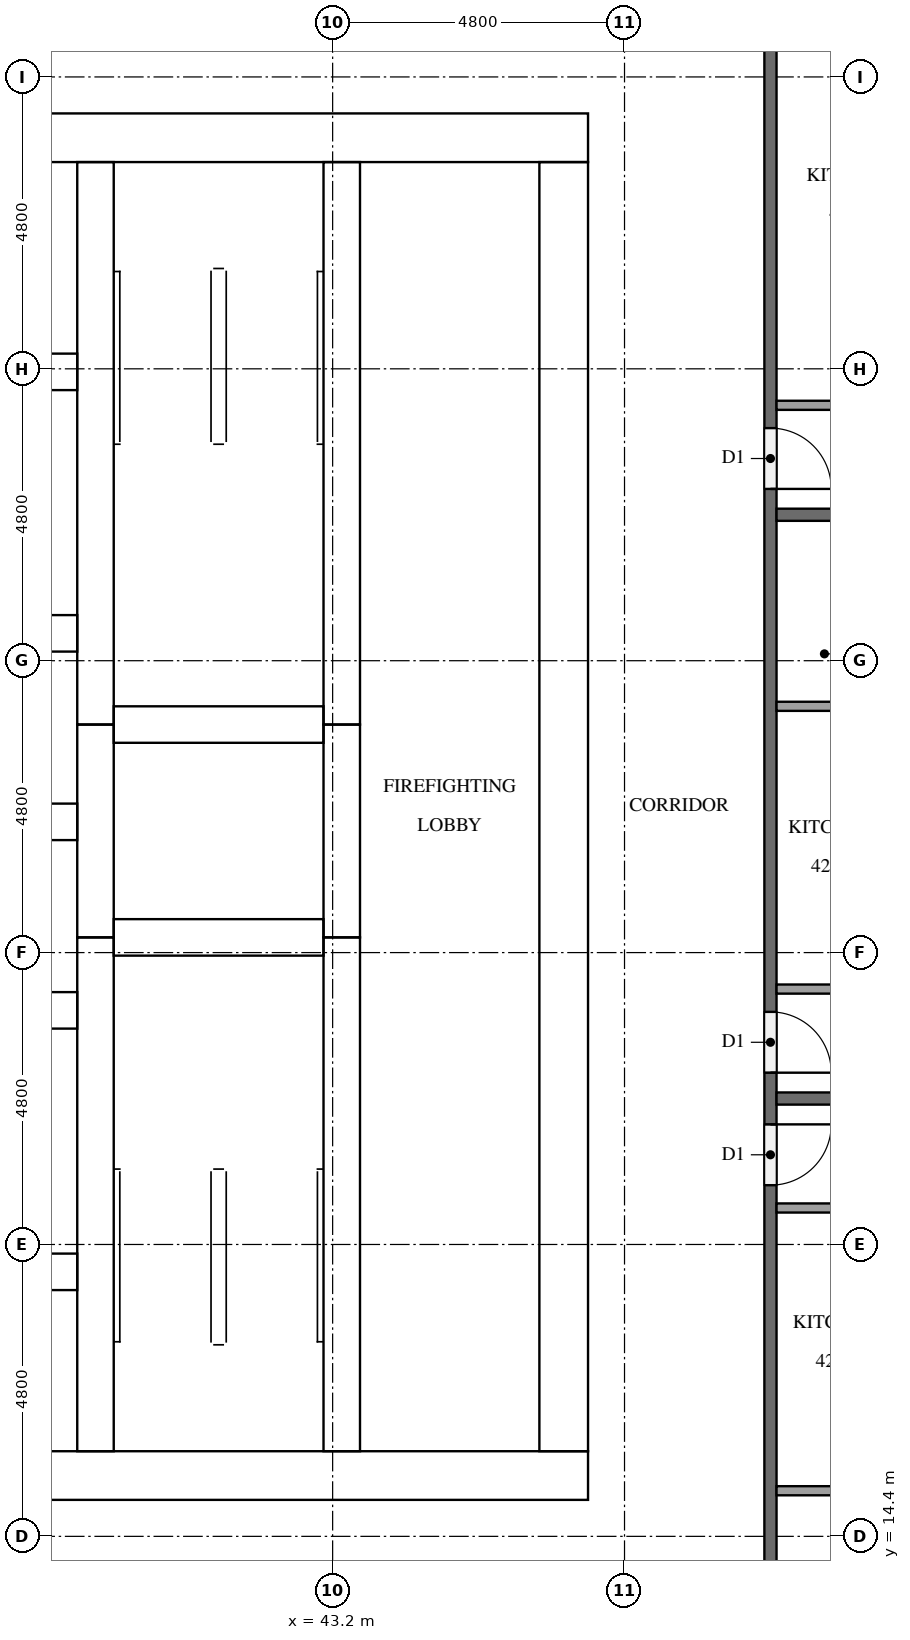
"""IFC4 building model, lengths in metres.
Left out: names, types, materials, properties, quantities, classifications, styles, units other than length and angle.
Written with IfcOpenShell. Run it as: python <this file> out.ifc"""

import sys

from ifc_helpers import new_model, si_unit, direction, frame, frame_2d, origin, place, context, subcontext, project, spatial, rectangle, extrude, element, fill, save


model = new_model("IFC4")
c1 = context("Model", 3, precision=1e-05, world=origin(), true_north=direction((0.0, 1.0)))
c2 = subcontext(c1, "Body", "Model", "MODEL_VIEW")
j1 = project(units=[si_unit("LENGTHUNIT", "METRE"), si_unit("PLANEANGLEUNIT", "RADIAN")], contexts=[c1])
p1 = place(None, origin())
s1 = spatial("IfcSite", under=j1, at=p1, CompositionType="ELEMENT")
p2 = place(p1, origin())
s2 = spatial("IfcBuilding", under=s1, at=p2, CompositionType="ELEMENT")
p3 = place(p2, frame((0.0, 0.0, 163.0)))
s3 = spatial("IfcBuildingStorey", under=s2, at=p3, CompositionType="ELEMENT", Elevation=163.0)
p4 = place(p3, frame((15.0, 15.4, 0.0), z_axis=(0.0, 0.0, 1.0), x_axis=(1.0, 0.0, 0.0)))
e1 = element("IfcWall", 1, at=p4, inside=s3, PredefinedType="SHEAR", context=c2, shape_type="SweptSolid", body=[
    extrude(rectangle(XDim=32.4, YDim=0.8, at=frame_2d((16.2, 0.0))), origin(), (0.0, 0.0, 1.0), 3.2),
])
p5 = place(p4, frame((15.3, 0.0, 0.0)))
e2 = element("IfcOpeningElement", 2, at=p5, cuts=e1, PredefinedType="OPENING", context=c2, shape_type="SweptSolid", body=[
    extrude(rectangle(XDim=1.8, YDim=2.1, at=frame_2d((0.9, 1.05))), frame((0.0, 0.41, 0.0), z_axis=(0.0, -1.0, 0.0), x_axis=(1.0, 0.0, 0.0)), (0.0, 0.0, 1.0), 0.82),
])
p6 = place(p3, frame((15.0, 37.4, 0.0), z_axis=(0.0, 0.0, 1.0), x_axis=(1.0, 0.0, 0.0)))
e3 = element("IfcWall", 3, at=p6, inside=s3, PredefinedType="SHEAR", context=c2, shape_type="SweptSolid", body=[
    extrude(rectangle(XDim=32.4, YDim=0.8, at=frame_2d((16.2, 0.0))), origin(), (0.0, 0.0, 1.0), 3.2),
])
p7 = place(p6, frame((15.3, 0.0, 0.0)))
e4 = element("IfcOpeningElement", 4, at=p7, cuts=e3, PredefinedType="OPENING", context=c2, shape_type="SweptSolid", body=[
    extrude(rectangle(XDim=1.8, YDim=2.1, at=frame_2d((0.9, 1.05))), frame((0.0, 0.41, 0.0), z_axis=(0.0, -1.0, 0.0), x_axis=(1.0, 0.0, 0.0)), (0.0, 0.0, 1.0), 0.82),
])
p8 = place(p6, frame((1.51, 0.0, 0.0)))
e5 = element("IfcOpeningElement", 5, at=p8, cuts=e3, PredefinedType="OPENING", context=c2, shape_type="SweptSolid", body=[
    extrude(rectangle(XDim=1.0, YDim=2.1, at=frame_2d((0.5, 1.05))), frame((0.0, 0.41, 0.0), z_axis=(0.0, -1.0, 0.0), x_axis=(1.0, 0.0, 0.0)), (0.0, 0.0, 1.0), 0.82),
])
p9 = place(p6, frame((5.11, 0.0, 0.0)))
e6 = element("IfcOpeningElement", 6, at=p9, cuts=e3, PredefinedType="OPENING", context=c2, shape_type="SweptSolid", body=[
    extrude(rectangle(XDim=1.0, YDim=2.1, at=frame_2d((0.5, 1.05))), frame((0.0, 0.41, 0.0), z_axis=(0.0, -1.0, 0.0), x_axis=(1.0, 0.0, 0.0)), (0.0, 0.0, 1.0), 0.82),
])
p10 = place(p3, frame((47.0, 15.8, 0.0), z_axis=(0.0, 0.0, 1.0), x_axis=(0.0, 1.0, 0.0)))
e7 = element("IfcWall", 7, at=p10, inside=s3, PredefinedType="SHEAR", context=c2, shape_type="SweptSolid", body=[
    extrude(rectangle(XDim=21.2, YDim=0.8, at=frame_2d((10.6, 0.0))), origin(), (0.0, 0.0, 1.0), 3.2),
])
p11 = place(p10, frame((10.3, 0.0, 0.0)))
e8 = element("IfcOpeningElement", 8, at=p11, cuts=e7, PredefinedType="OPENING", context=c2, shape_type="SweptSolid", body=[
    extrude(rectangle(XDim=1.2, YDim=2.1, at=frame_2d((0.6, 1.05))), frame((0.0, 0.41, 0.0), z_axis=(0.0, -1.0, 0.0), x_axis=(1.0, 0.0, 0.0)), (0.0, 0.0, 1.0), 0.82),
])
p12 = place(p3, frame((39.3, 15.8, 0.0), z_axis=(0.0, 0.0, 1.0), x_axis=(0.0, 1.0, 0.0)))
e9 = element("IfcWall", 9, at=p12, inside=s3, PredefinedType="SHEAR", context=c2, shape_type="SweptSolid", body=[
    extrude(rectangle(XDim=8.45, YDim=0.6, at=frame_2d((4.225, 0.0))), origin(), (0.0, 0.0, 1.0), 3.2),
])
p13 = place(p3, frame((39.3, 24.25, 0.0), z_axis=(0.0, 0.0, 1.0), x_axis=(0.0, 1.0, 0.0)))
e10 = element("IfcWall", 10, at=p13, inside=s3, PredefinedType="SHEAR", context=c2, shape_type="SweptSolid", body=[
    extrude(rectangle(XDim=3.5, YDim=0.6, at=frame_2d((1.75, 0.0))), origin(), (0.0, 0.0, 1.0), 3.2),
])
p14 = place(p3, frame((39.3, 27.75, 0.0), z_axis=(0.0, 0.0, 1.0), x_axis=(0.0, 1.0, 0.0)))
e11 = element("IfcWall", 11, at=p14, inside=s3, PredefinedType="SHEAR", context=c2, shape_type="SweptSolid", body=[
    extrude(rectangle(XDim=9.25, YDim=0.6, at=frame_2d((4.625, 0.0))), origin(), (0.0, 0.0, 1.0), 3.2),
])
p15 = place(p3, frame((43.35, 15.8, 0.0), z_axis=(0.0, 0.0, 1.0), x_axis=(0.0, 1.0, 0.0)))
e12 = element("IfcWall", 12, at=p15, inside=s3, PredefinedType="SHEAR", context=c2, shape_type="SweptSolid", body=[
    extrude(rectangle(XDim=8.45, YDim=0.6, at=frame_2d((4.225, 0.0))), origin(), (0.0, 0.0, 1.0), 3.2),
])
p16 = place(p15, frame((0.4, 0.0, 0.0)))
e13 = element("IfcOpeningElement", 13, at=p16, cuts=e12, PredefinedType="OPENING", context=c2, shape_type="SweptSolid", body=[
    extrude(rectangle(XDim=1.2, YDim=2.1, at=frame_2d((0.6, 1.05))), frame((0.0, 0.31, 0.0), z_axis=(0.0, -1.0, 0.0), x_axis=(1.0, 0.0, 0.0)), (0.0, 0.0, 1.0), 0.62),
])
p17 = place(p3, frame((43.35, 24.25, 0.0), z_axis=(0.0, 0.0, 1.0), x_axis=(0.0, 1.0, 0.0)))
e14 = element("IfcWall", 14, at=p17, inside=s3, PredefinedType="SHEAR", context=c2, shape_type="SweptSolid", body=[
    extrude(rectangle(XDim=3.5, YDim=0.6, at=frame_2d((1.75, 0.0))), origin(), (0.0, 0.0, 1.0), 3.2),
])
p18 = place(p17, frame((1.2, 0.0, 0.0)))
e15 = element("IfcOpeningElement", 15, at=p18, cuts=e14, PredefinedType="OPENING", context=c2, shape_type="SweptSolid", body=[
    extrude(rectangle(XDim=1.1, YDim=2.1, at=frame_2d((0.55, 1.05))), frame((0.0, 0.31, 0.0), z_axis=(0.0, -1.0, 0.0), x_axis=(1.0, 0.0, 0.0)), (0.0, 0.0, 1.0), 0.62),
])
p19 = place(p3, frame((43.35, 27.75, 0.0), z_axis=(0.0, 0.0, 1.0), x_axis=(0.0, 1.0, 0.0)))
e16 = element("IfcWall", 16, at=p19, inside=s3, PredefinedType="SHEAR", context=c2, shape_type="SweptSolid", body=[
    extrude(rectangle(XDim=9.25, YDim=0.6, at=frame_2d((4.625, 0.0))), origin(), (0.0, 0.0, 1.0), 3.2),
])
p20 = place(p19, frame((7.65, 0.0, 0.0)))
e17 = element("IfcOpeningElement", 17, at=p20, cuts=e16, PredefinedType="OPENING", context=c2, shape_type="SweptSolid", body=[
    extrude(rectangle(XDim=1.2, YDim=2.1, at=frame_2d((0.6, 1.05))), frame((0.0, 0.31, 0.0), z_axis=(0.0, -1.0, 0.0), x_axis=(1.0, 0.0, 0.0)), (0.0, 0.0, 1.0), 0.62),
])
for number, where, z_axis, x_axis in (
    (18, (39.6, 24.25, 0.0), (0.0, 0.0, 1.0), (1.0, 0.0, 0.0)),
    (19, (39.6, 27.75, 0.0), (0.0, 0.0, 1.0), (1.0, 0.0, 0.0)),
):
    element("IfcWall", number, at=place(p3, frame(where, z_axis=z_axis, x_axis=x_axis)), inside=s3, PredefinedType="SHEAR", context=c2, shape_type="SweptSolid", body=[
        extrude(rectangle(XDim=3.45, YDim=0.6, at=frame_2d((1.725, 0.0))), origin(), (0.0, 0.0, 1.0), 3.2),
    ])
p21 = place(p3, frame((33.4, 18.75, 0.0), z_axis=(0.0, 0.0, 1.0), x_axis=(1.0, 0.0, 0.0)))
e20 = element("IfcWall", 20, at=p21, inside=s3, PredefinedType="SHEAR", context=c2, shape_type="SweptSolid", body=[
    extrude(rectangle(XDim=5.6, YDim=0.6, at=frame_2d((2.8, 0.0))), origin(), (0.0, 0.0, 1.0), 3.2),
])
p22 = place(p21, frame((2.6, 0.0, 0.0)))
e21 = element("IfcOpeningElement", 21, at=p22, cuts=e20, PredefinedType="OPENING", context=c2, shape_type="SweptSolid", body=[
    extrude(rectangle(XDim=1.0, YDim=2.1, at=frame_2d((0.5, 1.05))), frame((0.0, 0.31, 0.0), z_axis=(0.0, -1.0, 0.0), x_axis=(1.0, 0.0, 0.0)), (0.0, 0.0, 1.0), 0.62),
])
p23 = place(p3, frame((23.4, 23.05, 0.0), z_axis=(0.0, 0.0, 1.0), x_axis=(1.0, 0.0, 0.0)))
e22 = element("IfcWall", 22, at=p23, inside=s3, PredefinedType="SHEAR", context=c2, shape_type="SweptSolid", body=[
    extrude(rectangle(XDim=15.6, YDim=0.6, at=frame_2d((7.8, 0.0))), origin(), (0.0, 0.0, 1.0), 3.2),
])
p24 = place(p23, frame((2.033, 0.0, 0.0)))
e23 = element("IfcOpeningElement", 23, at=p24, cuts=e22, PredefinedType="OPENING", context=c2, shape_type="SweptSolid", body=[
    extrude(rectangle(XDim=1.0, YDim=2.1, at=frame_2d((0.5, 1.05))), frame((0.0, 0.31, 0.0), z_axis=(0.0, -1.0, 0.0), x_axis=(1.0, 0.0, 0.0)), (0.0, 0.0, 1.0), 0.62),
])
p25 = place(p23, frame((12.567, 0.0, 0.0)))
e24 = element("IfcOpeningElement", 24, at=p25, cuts=e22, PredefinedType="OPENING", context=c2, shape_type="SweptSolid", body=[
    extrude(rectangle(XDim=1.0, YDim=2.1, at=frame_2d((0.5, 1.05))), frame((0.0, 0.31, 0.0), z_axis=(0.0, -1.0, 0.0), x_axis=(1.0, 0.0, 0.0)), (0.0, 0.0, 1.0), 0.62),
])
p26 = place(p3, frame((23.4, 26.15, 0.0), z_axis=(0.0, 0.0, 1.0), x_axis=(1.0, 0.0, 0.0)))
e25 = element("IfcWall", 25, at=p26, inside=s3, PredefinedType="SHEAR", context=c2, shape_type="SweptSolid", body=[
    extrude(rectangle(XDim=15.6, YDim=0.6, at=frame_2d((7.8, 0.0))), origin(), (0.0, 0.0, 1.0), 3.2),
])
p27 = place(p3, frame((23.4, 29.25, 0.0), z_axis=(0.0, 0.0, 1.0), x_axis=(1.0, 0.0, 0.0)))
e26 = element("IfcWall", 26, at=p27, inside=s3, PredefinedType="SHEAR", context=c2, shape_type="SweptSolid", body=[
    extrude(rectangle(XDim=15.6, YDim=0.6, at=frame_2d((7.8, 0.0))), origin(), (0.0, 0.0, 1.0), 3.2),
])
p28 = place(p27, frame((0.667, 0.0, 0.0)))
e27 = element("IfcOpeningElement", 27, at=p28, cuts=e26, PredefinedType="OPENING", context=c2, shape_type="SweptSolid", body=[
    extrude(rectangle(XDim=1.1, YDim=2.1, at=frame_2d((0.55, 1.05))), frame((0.0, 0.31, 0.0), z_axis=(0.0, -1.0, 0.0), x_axis=(1.0, 0.0, 0.0)), (0.0, 0.0, 1.0), 0.62),
])
p29 = place(p27, frame((3.3, 0.0, 0.0)))
e28 = element("IfcOpeningElement", 28, at=p29, cuts=e26, PredefinedType="OPENING", context=c2, shape_type="SweptSolid", body=[
    extrude(rectangle(XDim=1.1, YDim=2.1, at=frame_2d((0.55, 1.05))), frame((0.0, 0.31, 0.0), z_axis=(0.0, -1.0, 0.0), x_axis=(1.0, 0.0, 0.0)), (0.0, 0.0, 1.0), 0.62),
])
p30 = place(p27, frame((5.933, 0.0, 0.0)))
e29 = element("IfcOpeningElement", 29, at=p30, cuts=e26, PredefinedType="OPENING", context=c2, shape_type="SweptSolid", body=[
    extrude(rectangle(XDim=1.1, YDim=2.1, at=frame_2d((0.55, 1.05))), frame((0.0, 0.31, 0.0), z_axis=(0.0, -1.0, 0.0), x_axis=(1.0, 0.0, 0.0)), (0.0, 0.0, 1.0), 0.62),
])
p31 = place(p27, frame((8.567, 0.0, 0.0)))
e30 = element("IfcOpeningElement", 30, at=p31, cuts=e26, PredefinedType="OPENING", context=c2, shape_type="SweptSolid", body=[
    extrude(rectangle(XDim=1.1, YDim=2.1, at=frame_2d((0.55, 1.05))), frame((0.0, 0.31, 0.0), z_axis=(0.0, -1.0, 0.0), x_axis=(1.0, 0.0, 0.0)), (0.0, 0.0, 1.0), 0.62),
])
p32 = place(p27, frame((11.2, 0.0, 0.0)))
e31 = element("IfcOpeningElement", 31, at=p32, cuts=e26, PredefinedType="OPENING", context=c2, shape_type="SweptSolid", body=[
    extrude(rectangle(XDim=1.1, YDim=2.1, at=frame_2d((0.55, 1.05))), frame((0.0, 0.31, 0.0), z_axis=(0.0, -1.0, 0.0), x_axis=(1.0, 0.0, 0.0)), (0.0, 0.0, 1.0), 0.62),
])
p33 = place(p27, frame((13.833, 0.0, 0.0)))
e32 = element("IfcOpeningElement", 32, at=p33, cuts=e26, PredefinedType="OPENING", context=c2, shape_type="SweptSolid", body=[
    extrude(rectangle(XDim=1.1, YDim=2.1, at=frame_2d((0.55, 1.05))), frame((0.0, 0.31, 0.0), z_axis=(0.0, -1.0, 0.0), x_axis=(1.0, 0.0, 0.0)), (0.0, 0.0, 1.0), 0.62),
])
p34 = place(p3, frame((33.4, 33.55, 0.0), z_axis=(0.0, 0.0, 1.0), x_axis=(1.0, 0.0, 0.0)))
e33 = element("IfcWall", 33, at=p34, inside=s3, PredefinedType="SHEAR", context=c2, shape_type="SweptSolid", body=[
    extrude(rectangle(XDim=5.6, YDim=0.6, at=frame_2d((2.8, 0.0))), origin(), (0.0, 0.0, 1.0), 3.2),
])
p35 = place(p34, frame((2.6, 0.0, 0.0)))
e34 = element("IfcOpeningElement", 34, at=p35, cuts=e33, PredefinedType="OPENING", context=c2, shape_type="SweptSolid", body=[
    extrude(rectangle(XDim=1.0, YDim=2.1, at=frame_2d((0.5, 1.05))), frame((0.0, 0.31, 0.0), z_axis=(0.0, -1.0, 0.0), x_axis=(1.0, 0.0, 0.0)), (0.0, 0.0, 1.0), 0.62),
])
p36 = place(p3, frame((50.4, 40.7, 0.0), z_axis=(0.0, 0.0, 1.0), x_axis=(0.0, -1.0, 0.0)))
e35 = element("IfcWall", 35, at=p36, inside=s3, PredefinedType="PARTITIONING", context=c2, shape_type="SweptSolid", body=[
    extrude(rectangle(XDim=28.6, YDim=0.2, at=frame_2d((14.3, 0.0))), origin(), (0.0, 0.0, 1.0), 3.2),
])
p37 = place(p36, frame((19.525, 0.0, 0.0)))
e36 = element("IfcOpeningElement", 36, at=p37, cuts=e35, PredefinedType="OPENING", context=c2, shape_type="SweptSolid", body=[
    extrude(rectangle(XDim=1.0, YDim=2.1, at=frame_2d((0.5, 1.05))), frame((0.0, 0.11, 0.0), z_axis=(0.0, -1.0, 0.0), x_axis=(1.0, 0.0, 0.0)), (0.0, 0.0, 1.0), 0.22),
])
p38 = place(p36, frame((17.675, 0.0, 0.0)))
e37 = element("IfcOpeningElement", 37, at=p38, cuts=e35, PredefinedType="OPENING", context=c2, shape_type="SweptSolid", body=[
    extrude(rectangle(XDim=1.0, YDim=2.1, at=frame_2d((0.5, 1.05))), frame((0.0, 0.11, 0.0), z_axis=(0.0, -1.0, 0.0), x_axis=(1.0, 0.0, 0.0)), (0.0, 0.0, 1.0), 0.22),
])
p39 = place(p36, frame((8.075, 0.0, 0.0)))
e38 = element("IfcOpeningElement", 38, at=p39, cuts=e35, PredefinedType="OPENING", context=c2, shape_type="SweptSolid", body=[
    extrude(rectangle(XDim=1.0, YDim=2.1, at=frame_2d((0.5, 1.05))), frame((0.0, 0.11, 0.0), z_axis=(0.0, -1.0, 0.0), x_axis=(1.0, 0.0, 0.0)), (0.0, 0.0, 1.0), 0.22),
])
for number, where, z_axis, x_axis in (
    (39, (50.5, 21.6, 0.0), (0.0, 0.0, 1.0), (1.0, 0.0, 0.0)),
    (40, (50.5, 31.2, 0.0), (0.0, 0.0, 1.0), (1.0, 0.0, 0.0)),
):
    element("IfcWall", number, at=place(p3, frame(where, z_axis=z_axis, x_axis=x_axis)), inside=s3, PredefinedType="PARTITIONING", context=c2, shape_type="SweptSolid", body=[
        extrude(rectangle(XDim=7.0, YDim=0.2, at=frame_2d((3.5, 0.0))), origin(), (0.0, 0.0, 1.0), 3.2),
    ])
p40 = place(p3, frame((50.5, 15.15, 0.0), z_axis=(0.0, 0.0, 1.0), x_axis=(1.0, 0.0, 0.0)))
e41 = element("IfcWall", 41, at=p40, inside=s3, PredefinedType="PARTITIONING", context=c2, shape_type="SweptSolid", body=[
    extrude(rectangle(XDim=1.925, YDim=0.15, at=frame_2d((0.962, 0.0))), origin(), (0.0, 0.0, 1.0), 3.2),
])
p41 = place(p3, frame((50.5, 19.8, 0.0), z_axis=(0.0, 0.0, 1.0), x_axis=(1.0, 0.0, 0.0)))
e42 = element("IfcWall", 42, at=p41, inside=s3, PredefinedType="PARTITIONING", context=c2, shape_type="SweptSolid", body=[
    extrude(rectangle(XDim=2.075, YDim=0.15, at=frame_2d((1.038, 0.0))), origin(), (0.0, 0.0, 1.0), 3.2),
])
p42 = place(p3, frame((50.5, 28.05, 0.0), z_axis=(0.0, 0.0, 1.0), x_axis=(1.0, 0.0, 0.0)))
e43 = element("IfcWall", 43, at=p42, inside=s3, PredefinedType="PARTITIONING", context=c2, shape_type="SweptSolid", body=[
    extrude(rectangle(XDim=1.775, YDim=0.15, at=frame_2d((0.887, 0.0))), origin(), (0.0, 0.0, 1.0), 3.2),
])
p43 = place(p3, frame((50.5, 23.4, 0.0), z_axis=(0.0, 0.0, 1.0), x_axis=(1.0, 0.0, 0.0)))
e44 = element("IfcWall", 44, at=p43, inside=s3, PredefinedType="PARTITIONING", context=c2, shape_type="SweptSolid", body=[
    extrude(rectangle(XDim=1.925, YDim=0.15, at=frame_2d((0.962, 0.0))), origin(), (0.0, 0.0, 1.0), 3.2),
])
p44 = place(p3, frame((50.5, 33.0, 0.0), z_axis=(0.0, 0.0, 1.0), x_axis=(1.0, 0.0, 0.0)))
e45 = element("IfcWall", 45, at=p44, inside=s3, PredefinedType="PARTITIONING", context=c2, shape_type="SweptSolid", body=[
    extrude(rectangle(XDim=2.525, YDim=0.15, at=frame_2d((1.262, 0.0))), origin(), (0.0, 0.0, 1.0), 3.2),
])
p45 = place(p18, origin())
e46 = element("IfcDoor", 46, at=p45, inside=s3, OperationType="DOUBLE_DOOR_SLIDING", PredefinedType="DOOR", context=c2, shape_type="SweptSolid", body=[
    extrude(rectangle(XDim=1.1, YDim=2.1, at=frame_2d((0.55, 1.05))), frame((0.0, 0.025, 0.0), z_axis=(0.0, -1.0, 0.0), x_axis=(1.0, 0.0, 0.0)), (0.0, 0.0, 1.0), 0.05),
])
fill(e15, e46)
p46 = place(p16, origin())
e47 = element("IfcDoor", 47, at=p46, inside=s3, OperationType="SINGLE_SWING_LEFT", PredefinedType="DOOR", context=c2, shape_type="SweptSolid", body=[
    extrude(rectangle(XDim=1.2, YDim=2.1, at=frame_2d((0.6, 1.05))), frame((0.0, 0.025, 0.0), z_axis=(0.0, -1.0, 0.0), x_axis=(1.0, 0.0, 0.0)), (0.0, 0.0, 1.0), 0.05),
])
fill(e13, e47)
p47 = place(p20, origin())
e48 = element("IfcDoor", 48, at=p47, inside=s3, OperationType="SINGLE_SWING_RIGHT", PredefinedType="DOOR", context=c2, shape_type="SweptSolid", body=[
    extrude(rectangle(XDim=1.2, YDim=2.1, at=frame_2d((0.6, 1.05))), frame((0.0, 0.025, 0.0), z_axis=(0.0, -1.0, 0.0), x_axis=(1.0, 0.0, 0.0)), (0.0, 0.0, 1.0), 0.05),
])
fill(e17, e48)
p48 = place(p11, origin())
e49 = element("IfcDoor", 49, at=p48, inside=s3, OperationType="SINGLE_SWING_RIGHT", PredefinedType="DOOR", context=c2, shape_type="SweptSolid", body=[
    extrude(rectangle(XDim=1.2, YDim=2.1, at=frame_2d((0.6, 1.05))), frame((0.0, 0.025, 0.0), z_axis=(0.0, -1.0, 0.0), x_axis=(1.0, 0.0, 0.0)), (0.0, 0.0, 1.0), 0.05),
])
fill(e8, e49)
p49 = place(p37, origin())
e50 = element("IfcDoor", 50, at=p49, inside=s3, OperationType="SINGLE_SWING_LEFT", PredefinedType="DOOR", context=c2, shape_type="SweptSolid", body=[
    extrude(rectangle(XDim=1.0, YDim=2.1, at=frame_2d((0.5, 1.05))), frame((0.0, 0.025, 0.0), z_axis=(0.0, -1.0, 0.0), x_axis=(1.0, 0.0, 0.0)), (0.0, 0.0, 1.0), 0.05),
])
fill(e36, e50)
p50 = place(p38, origin())
e51 = element("IfcDoor", 51, at=p50, inside=s3, OperationType="SINGLE_SWING_RIGHT", PredefinedType="DOOR", context=c2, shape_type="SweptSolid", body=[
    extrude(rectangle(XDim=1.0, YDim=2.1, at=frame_2d((0.5, 1.05))), frame((0.0, 0.025, 0.0), z_axis=(0.0, -1.0, 0.0), x_axis=(1.0, 0.0, 0.0)), (0.0, 0.0, 1.0), 0.05),
])
fill(e37, e51)
p51 = place(p39, origin())
e52 = element("IfcDoor", 52, at=p51, inside=s3, OperationType="SINGLE_SWING_RIGHT", PredefinedType="DOOR", context=c2, shape_type="SweptSolid", body=[
    extrude(rectangle(XDim=1.0, YDim=2.1, at=frame_2d((0.5, 1.05))), frame((0.0, 0.025, 0.0), z_axis=(0.0, -1.0, 0.0), x_axis=(1.0, 0.0, 0.0)), (0.0, 0.0, 1.0), 0.05),
])
fill(e38, e52)
save(model, sys.argv[1])
